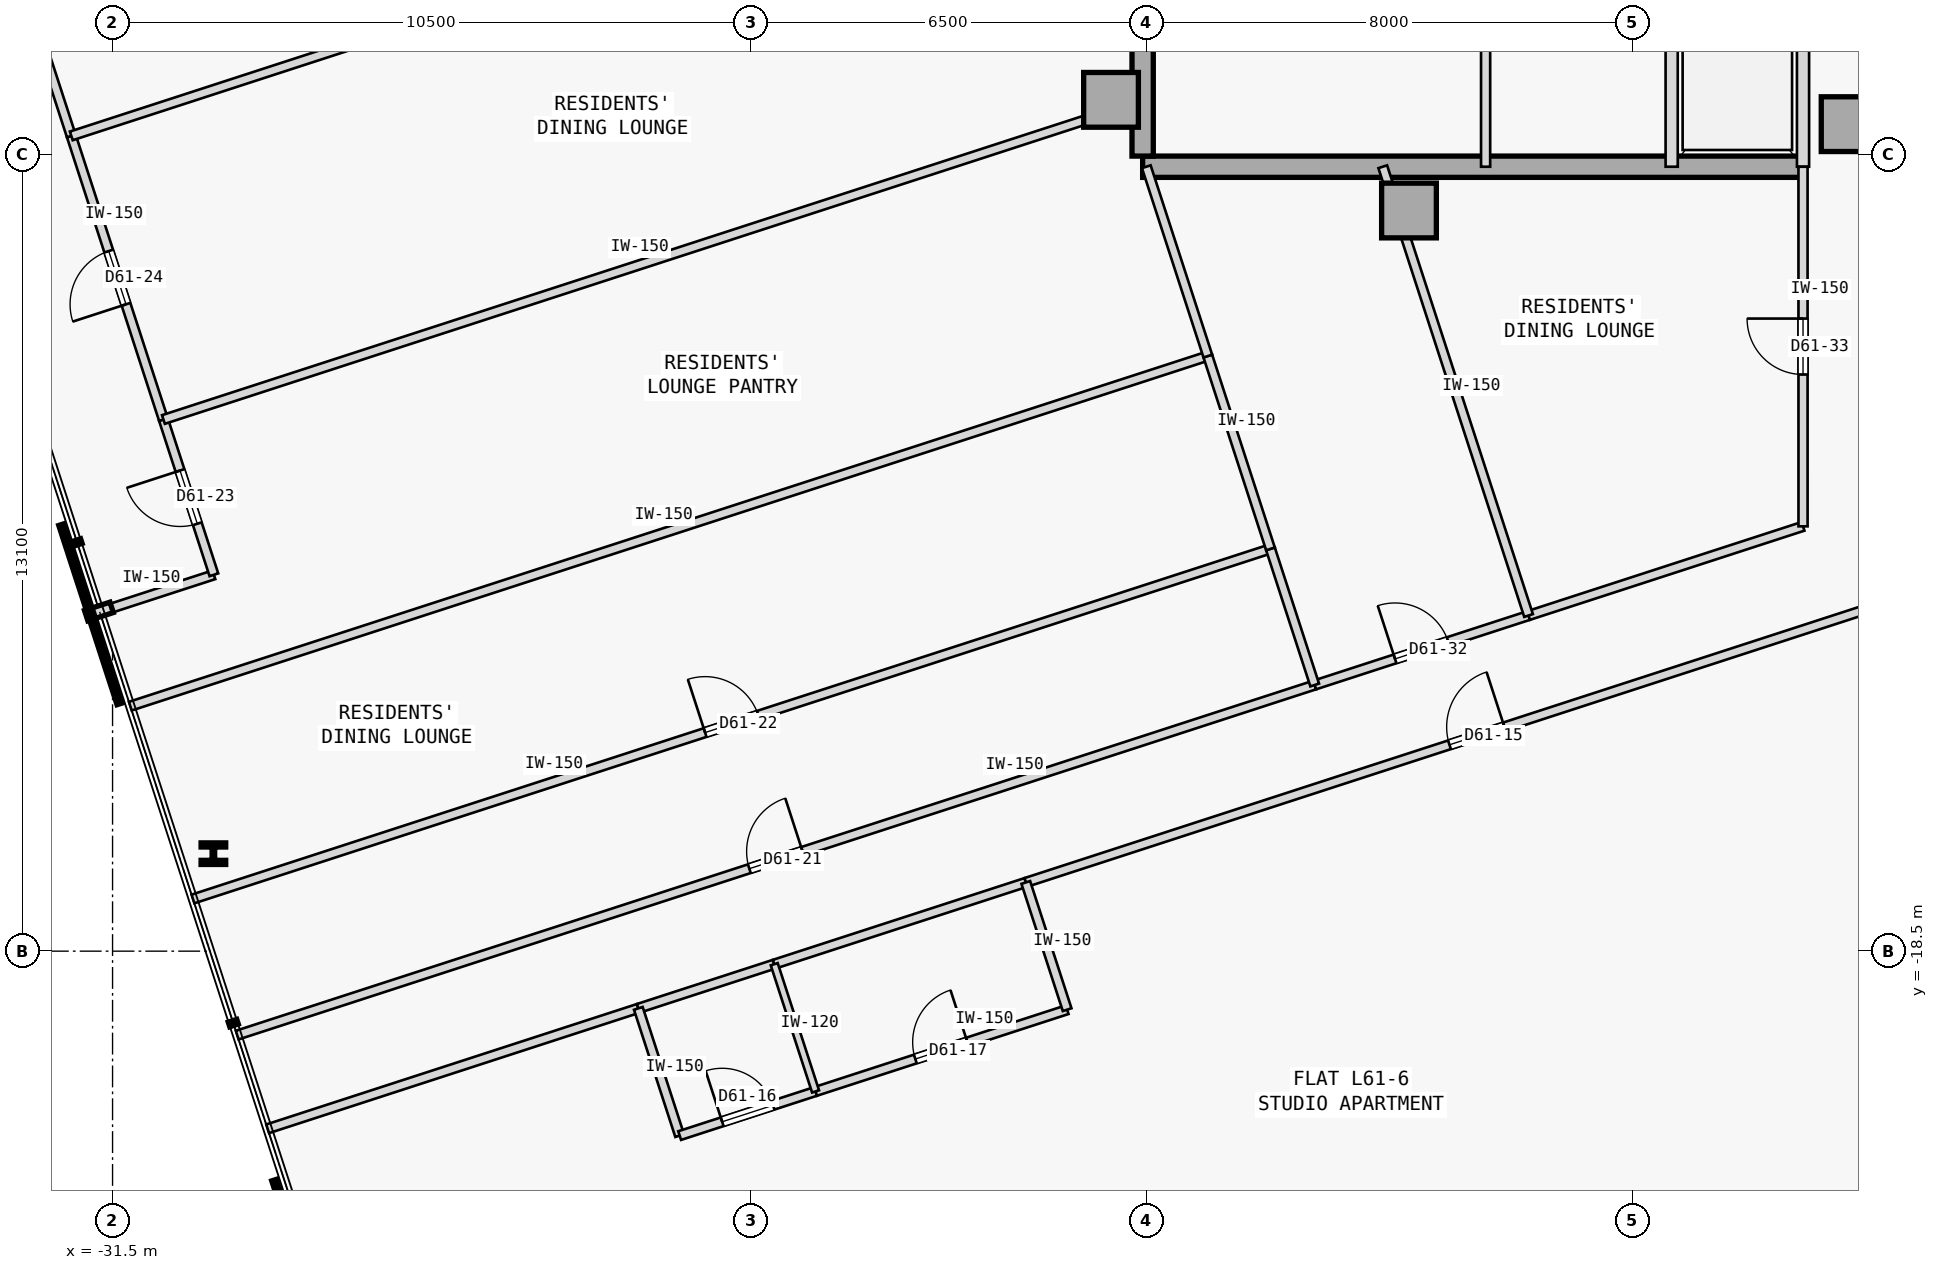
"""IFC4 building model, lengths in metres.
Left out: names, types, materials, properties, quantities, classifications, styles, units other than length and angle.
Written with IfcOpenShell. Run it as: python <this file> out.ifc"""

import sys

from ifc_helpers import new_model, si_unit, direction, frame, frame_2d, origin, origin_2d, place, context, subcontext, project, spatial, rectangle, i_section, extrude, element, fill, save


model = new_model("IFC4")
c1 = context("Model", 3, precision=1e-05, world=origin(), true_north=direction((0.0, 1.0)))
c2 = subcontext(c1, "Body", "Model", "MODEL_VIEW")
j1 = project(units=[si_unit("LENGTHUNIT", "METRE"), si_unit("PLANEANGLEUNIT", "RADIAN")], contexts=[c1])
p1 = place(None, origin())
s1 = spatial("IfcSite", under=j1, at=p1, CompositionType="ELEMENT")
p2 = place(p1, origin())
s2 = spatial("IfcBuilding", under=s1, at=p2, CompositionType="ELEMENT")
p3 = place(p2, frame((0.0, 0.0, 231.0)))
s3 = spatial("IfcBuildingStorey", under=s2, at=p3, CompositionType="ELEMENT", Elevation=231.0)
for number, where, z_axis, x_axis in (
    (1, (-15.08, -4.5, 0.0), (0.0, 0.0, 1.0), (1.0, 0.0, 0.0)),
    (2, (-10.18, -6.32, 0.0), (0.0, 0.0, 1.0), (1.0, 0.0, 0.0)),
    (3, (-2.95, -4.9, 0.0), (0.0, 0.0, 1.0), (1.0, 0.0, 0.0)),
):
    element("IfcColumn", number, at=place(p3, frame(where, z_axis=z_axis, x_axis=x_axis)), inside=s3, PredefinedType="COLUMN", context=c2, shape_type="SweptSolid", body=[
        extrude(rectangle(XDim=0.9, YDim=0.9, at=origin_2d()), origin(), (0.0, 0.0, 1.0), 3.35),
    ])
p4 = place(p3, frame((-14.56, -5.6, 0.0), z_axis=(0.0, 0.0, 1.0), x_axis=(1.0, 0.0, 0.0)))
e4 = element("IfcWall", 4, at=p4, inside=s3, PredefinedType="SHEAR", context=c2, shape_type="SweptSolid", body=[
    extrude(rectangle(XDim=10.86, YDim=0.35, at=frame_2d((5.43, 0.0))), origin(), (0.0, 0.0, 1.0), 3.125),
])
p5 = place(p3, frame((-14.56, -5.425, 0.0), z_axis=(0.0, 0.0, 1.0), x_axis=(0.0, 1.0, 0.0)))
e5 = element("IfcWall", 5, at=p5, inside=s3, PredefinedType="SHEAR", context=c2, shape_type="SweptSolid", body=[
    extrude(rectangle(XDim=10.85, YDim=0.35, at=frame_2d((5.425, 0.0))), origin(), (0.0, 0.0, 1.0), 3.125),
])
p6 = place(p3, frame((-29.842, -16.897, 0.0), z_axis=(0.0, 0.0, 1.0), x_axis=(1.0, 0.0, 0.0)))
e6 = element("IfcColumn", 6, at=p6, inside=s3, PredefinedType="COLUMN", context=c2, shape_type="SweptSolid", body=[
    extrude(i_section(OverallWidth=0.405, OverallDepth=0.355, WebThickness=0.042, FlangeThickness=0.068, FilletRadius=0.015, at=origin_2d()), origin(), (0.0, 0.0, 1.0), 3.35),
])
for number, where, z_axis, x_axis in (
    (7, (-3.7, -5.6, 0.0), (0.0, 0.0, 1.0), (0.0, 1.0, 0.0)),
    (8, (-5.86, -5.6, 0.0), (0.0, 0.0, 1.0), (0.0, 1.0, 0.0)),
):
    element("IfcWall", number, at=place(p3, frame(where, z_axis=z_axis, x_axis=x_axis)), inside=s3, PredefinedType="STANDARD", context=c2, shape_type="SweptSolid", body=[
        extrude(rectangle(XDim=2.65, YDim=0.2, at=frame_2d((1.325, 0.0))), origin(), (0.0, 0.0, 1.0), 3.125),
    ])
p7 = place(p3, frame((-8.92, -5.6, 0.0), z_axis=(0.0, 0.0, 1.0), x_axis=(0.0, 1.0, 0.0)))
e9 = element("IfcWall", 9, at=p7, inside=s3, PredefinedType="PARTITIONING", context=c2, shape_type="SweptSolid", body=[
    extrude(rectangle(XDim=2.65, YDim=0.15, at=frame_2d((1.325, 0.0))), origin(), (0.0, 0.0, 1.0), 3.125),
])
p8 = place(p3, frame((-28.95, -21.421, 0.0), z_axis=(0.0, 0.0, 1.0), x_axis=(0.951048062645, 0.309043010825, 0.0)))
e10 = element("IfcWall", 10, at=p8, inside=s3, PredefinedType="PARTITIONING", context=c2, shape_type="SweptSolid", body=[
    extrude(rectangle(XDim=6.41, YDim=0.15, at=frame_2d((3.205, 0.0))), origin(), (0.0, 0.0, 1.0), 3.125),
])
p9 = place(p3, frame((-16.482, -17.37, 0.0), z_axis=(0.0, 0.0, 1.0), x_axis=(0.9510563751, 0.309017428929, 0.0)))
e11 = element("IfcWall", 11, at=p9, inside=s3, PredefinedType="PARTITIONING", context=c2, shape_type="SweptSolid", body=[
    extrude(rectangle(XDim=15.602, YDim=0.15, at=frame_2d((7.801, 0.0))), origin(), (0.0, 0.0, 1.0), 3.125),
])
p10 = place(p9, frame((7.326, 0.0, 0.0)))
e12 = element("IfcOpeningElement", 12, at=p10, cuts=e11, PredefinedType="OPENING", context=c2, shape_type="SweptSolid", body=[
    extrude(rectangle(XDim=0.95, YDim=2.15, at=frame_2d((0.475, 1.075))), frame((0.0, 0.085, 0.0), z_axis=(0.0, -1.0, 0.0), x_axis=(1.0, 0.0, 0.0)), (0.0, 0.0, 1.0), 0.17),
])
p11 = place(p3, frame((-22.854, -19.44, 0.0), z_axis=(0.0, 0.0, 1.0), x_axis=(0.951076048914, 0.308956872689, 0.0)))
e13 = element("IfcWall", 13, at=p11, inside=s3, PredefinedType="PARTITIONING", context=c2, shape_type="SweptSolid", body=[
    extrude(rectangle(XDim=2.35, YDim=0.15, at=frame_2d((1.175, 0.0))), origin(), (0.0, 0.0, 1.0), 3.125),
])
p12 = place(p3, frame((-20.619, -18.714, 0.0), z_axis=(0.0, 0.0, 1.0), x_axis=(0.951052627573, 0.309028962374, 0.0)))
e14 = element("IfcWall", 14, at=p12, inside=s3, PredefinedType="PARTITIONING", context=c2, shape_type="SweptSolid", body=[
    extrude(rectangle(XDim=4.35, YDim=0.15, at=frame_2d((2.175, 0.0))), origin(), (0.0, 0.0, 1.0), 3.125),
])
p13 = place(p3, frame((-29.45, -19.881, 0.0), z_axis=(0.0, 0.0, 1.0), x_axis=(0.95105650271, 0.309017036186, 0.0)))
e15 = element("IfcWall", 15, at=p13, inside=s3, PredefinedType="PARTITIONING", context=c2, shape_type="SweptSolid", body=[
    extrude(rectangle(XDim=18.632, YDim=0.15, at=frame_2d((9.316, 0.0))), origin(), (0.0, 0.0, 1.0), 3.125),
])
p14 = place(p13, frame((8.856, 0.0, 0.0)))
e16 = element("IfcOpeningElement", 16, at=p14, cuts=e15, PredefinedType="OPENING", context=c2, shape_type="SweptSolid", body=[
    extrude(rectangle(XDim=0.92, YDim=2.15, at=frame_2d((0.46, 1.075))), frame((0.0, 0.085, 0.0), z_axis=(0.0, -1.0, 0.0), x_axis=(1.0, 0.0, 0.0)), (0.0, 0.0, 1.0), 0.17),
])
p15 = place(p3, frame((-31.712, -12.921, 0.0), z_axis=(0.0, 0.0, 1.0), x_axis=(0.951054051148, 0.309024581215, 0.0)))
e17 = element("IfcWall", 17, at=p15, inside=s3, PredefinedType="PARTITIONING", context=c2, shape_type="SweptSolid", body=[
    extrude(rectangle(XDim=1.975, YDim=0.15, at=frame_2d((0.988, 0.0))), origin(), (0.0, 0.0, 1.0), 3.125),
])
p16 = place(p3, frame((-29.833, -12.311, 0.0), z_axis=(0.0, 0.0, 1.0), x_axis=(-0.309044953986, 0.951047431213, 0.0)))
e18 = element("IfcWall", 18, at=p16, inside=s3, PredefinedType="PARTITIONING", context=c2, shape_type="SweptSolid", body=[
    extrude(rectangle(XDim=2.685, YDim=0.15, at=frame_2d((1.343, 0.0))), origin(), (0.0, 0.0, 1.0), 3.125),
])
p17 = place(p16, frame((0.883, 0.0, 0.0)))
e19 = element("IfcOpeningElement", 19, at=p17, cuts=e18, PredefinedType="OPENING", context=c2, shape_type="SweptSolid", body=[
    extrude(rectangle(XDim=0.92, YDim=2.15, at=frame_2d((0.46, 1.075))), frame((0.0, 0.085, 0.0), z_axis=(0.0, -1.0, 0.0), x_axis=(1.0, 0.0, 0.0)), (0.0, 0.0, 1.0), 0.17),
])
p18 = place(p3, frame((-30.663, -9.757, 0.0), z_axis=(0.0, 0.0, 1.0), x_axis=(-0.309019653166, 0.951055652397, 0.0)))
e20 = element("IfcWall", 20, at=p18, inside=s3, PredefinedType="PARTITIONING", context=c2, shape_type="SweptSolid", body=[
    extrude(rectangle(XDim=4.904, YDim=0.15, at=frame_2d((2.452, 0.0))), origin(), (0.0, 0.0, 1.0), 3.125),
])
p19 = place(p18, frame((1.992, 0.0, 0.0)))
e21 = element("IfcOpeningElement", 21, at=p19, cuts=e20, PredefinedType="OPENING", context=c2, shape_type="SweptSolid", body=[
    extrude(rectangle(XDim=0.92, YDim=2.15, at=frame_2d((0.46, 1.075))), frame((0.0, 0.085, 0.0), z_axis=(0.0, -1.0, 0.0), x_axis=(1.0, 0.0, 0.0)), (0.0, 0.0, 1.0), 0.17),
])
p20 = place(p3, frame((-32.179, -5.093, 0.0), z_axis=(0.0, 0.0, 1.0), x_axis=(-0.309014532869, 0.951057316083, 0.0)))
e22 = element("IfcWall", 22, at=p20, inside=s3, PredefinedType="PARTITIONING", context=c2, shape_type="SweptSolid", body=[
    extrude(rectangle(XDim=4.707, YDim=0.15, at=frame_2d((2.354, 0.0))), origin(), (0.0, 0.0, 1.0), 3.125),
])
p21 = place(p3, frame((-11.73, -14.123, 0.0), z_axis=(0.0, 0.0, 1.0), x_axis=(0.951052502763, 0.309029346483, 0.0)))
e23 = element("IfcWall", 23, at=p21, inside=s3, PredefinedType="PARTITIONING", context=c2, shape_type="SweptSolid", body=[
    extrude(rectangle(XDim=3.698, YDim=0.15, at=frame_2d((1.849, 0.0))), origin(), (0.0, 0.0, 1.0), 3.125),
])
p22 = place(p21, frame((1.389, 0.0, 0.0)))
e24 = element("IfcOpeningElement", 24, at=p22, cuts=e23, PredefinedType="OPENING", context=c2, shape_type="SweptSolid", body=[
    extrude(rectangle(XDim=0.92, YDim=2.15, at=frame_2d((0.46, 1.075))), frame((0.0, 0.085, 0.0), z_axis=(0.0, -1.0, 0.0), x_axis=(1.0, 0.0, 0.0)), (0.0, 0.0, 1.0), 0.17),
])
p23 = place(p3, frame((-8.213, -12.98, 0.0), z_axis=(0.0, 0.0, 1.0), x_axis=(0.951058260096, 0.309011627456, 0.0)))
e25 = element("IfcWall", 25, at=p23, inside=s3, PredefinedType="PARTITIONING", context=c2, shape_type="SweptSolid", body=[
    extrude(rectangle(XDim=4.746, YDim=0.15, at=frame_2d((2.373, 0.0))), origin(), (0.0, 0.0, 1.0), 3.125),
])
p24 = place(p3, frame((-3.7, -11.514, 0.0), z_axis=(0.0, 0.0, 1.0), x_axis=(-8.2572974e-05, 0.999999996591, 0.0)))
e26 = element("IfcWall", 26, at=p24, inside=s3, PredefinedType="PARTITIONING", context=c2, shape_type="SweptSolid", body=[
    extrude(rectangle(XDim=5.913, YDim=0.15, at=frame_2d((2.957, 0.0))), origin(), (0.0, 0.0, 1.0), 3.125),
])
p25 = place(p24, frame((2.497, 0.0, 0.0)))
e27 = element("IfcOpeningElement", 27, at=p25, cuts=e26, PredefinedType="OPENING", context=c2, shape_type="SweptSolid", body=[
    extrude(rectangle(XDim=0.92, YDim=2.15, at=frame_2d((0.46, 1.075))), frame((0.0, 0.085, 0.0), z_axis=(0.0, -1.0, 0.0), x_axis=(1.0, 0.0, 0.0)), (0.0, 0.0, 1.0), 0.17),
])
p26 = place(p3, frame((-22.174, -21.533, 0.0), z_axis=(0.0, 0.0, 1.0), x_axis=(-0.309028364152, 0.951052821956, 0.0)))
e28 = element("IfcWall", 28, at=p26, inside=s3, PredefinedType="PARTITIONING", context=c2, shape_type="SweptSolid", body=[
    extrude(rectangle(XDim=2.2, YDim=0.15, at=frame_2d((1.1, 0.0))), origin(), (0.0, 0.0, 1.0), 3.125),
])
p27 = place(p3, frame((-22.174, -21.533, 0.0), z_axis=(0.0, 0.0, 1.0), x_axis=(0.951045519245, 0.309050837767, 0.0)))
e29 = element("IfcWall", 29, at=p27, inside=s3, PredefinedType="PARTITIONING", context=c2, shape_type="SweptSolid", body=[
    extrude(rectangle(XDim=2.35, YDim=0.15, at=frame_2d((1.175, 0.0))), origin(), (0.0, 0.0, 1.0), 3.125),
])
p28 = place(p27, frame((0.735, 0.0, 0.0)))
e30 = element("IfcOpeningElement", 30, at=p28, cuts=e29, PredefinedType="OPENING", context=c2, shape_type="SweptSolid", body=[
    extrude(rectangle(XDim=0.88, YDim=2.15, at=frame_2d((0.44, 1.075))), frame((0.0, 0.085, 0.0), z_axis=(0.0, -1.0, 0.0), x_axis=(1.0, 0.0, 0.0)), (0.0, 0.0, 1.0), 0.17),
])
p29 = place(p3, frame((-19.939, -20.807, 0.0), z_axis=(0.0, 0.0, 1.0), x_axis=(0.951052627573, 0.309028962374, 0.0)))
e31 = element("IfcWall", 31, at=p29, inside=s3, PredefinedType="PARTITIONING", context=c2, shape_type="SweptSolid", body=[
    extrude(rectangle(XDim=4.35, YDim=0.15, at=frame_2d((2.175, 0.0))), origin(), (0.0, 0.0, 1.0), 3.125),
])
p30 = place(p29, frame((1.725, 0.0, 0.0)))
e32 = element("IfcOpeningElement", 32, at=p30, cuts=e31, PredefinedType="OPENING", context=c2, shape_type="SweptSolid", body=[
    extrude(rectangle(XDim=0.9, YDim=2.15, at=frame_2d((0.45, 1.075))), frame((0.0, 0.085, 0.0), z_axis=(0.0, -1.0, 0.0), x_axis=(1.0, 0.0, 0.0)), (0.0, 0.0, 1.0), 0.17),
])
p31 = place(p3, frame((-15.802, -19.462, 0.0), z_axis=(0.0, 0.0, 1.0), x_axis=(-0.309060979314, 0.951042223598, 0.0)))
e33 = element("IfcWall", 33, at=p31, inside=s3, PredefinedType="PARTITIONING", context=c2, shape_type="SweptSolid", body=[
    extrude(rectangle(XDim=2.2, YDim=0.15, at=frame_2d((1.1, 0.0))), origin(), (0.0, 0.0, 1.0), 3.125),
])
p32 = place(p3, frame((-19.939, -20.807, 0.0), z_axis=(0.0, 0.0, 1.0), x_axis=(-0.309060979314, 0.951042223598, 0.0)))
e34 = element("IfcWall", 34, at=p32, inside=s3, PredefinedType="PARTITIONING", context=c2, shape_type="SweptSolid", body=[
    extrude(rectangle(XDim=2.2, YDim=0.12, at=frame_2d((1.1, 0.0))), origin(), (0.0, 0.0, 1.0), 3.125),
])
p33 = place(p3, frame((-30.178, -17.642, 0.0), z_axis=(0.0, 0.0, 1.0), x_axis=(0.95105650271, 0.309017036186, 0.0)))
e35 = element("IfcWall", 35, at=p33, inside=s3, PredefinedType="PARTITIONING", context=c2, shape_type="SweptSolid", body=[
    extrude(rectangle(XDim=18.632, YDim=0.15, at=frame_2d((9.316, 0.0))), origin(), (0.0, 0.0, 1.0), 3.125),
])
p34 = place(p33, frame((8.856, 0.0, 0.0)))
e36 = element("IfcOpeningElement", 36, at=p34, cuts=e35, PredefinedType="OPENING", context=c2, shape_type="SweptSolid", body=[
    extrude(rectangle(XDim=0.92, YDim=2.15, at=frame_2d((0.46, 1.075))), frame((0.0, 0.085, 0.0), z_axis=(0.0, -1.0, 0.0), x_axis=(1.0, 0.0, 0.0)), (0.0, 0.0, 1.0), 0.17),
])
p35 = place(p3, frame((-11.73, -14.123, 0.0), z_axis=(0.0, 0.0, 1.0), x_axis=(-0.309062621189, 0.951041690035, 0.0)))
e37 = element("IfcWall", 37, at=p35, inside=s3, PredefinedType="PARTITIONING", context=c2, shape_type="SweptSolid", body=[
    extrude(rectangle(XDim=2.354, YDim=0.15, at=frame_2d((1.177, 0.0))), origin(), (0.0, 0.0, 1.0), 3.125),
])
p36 = place(p3, frame((-31.208, -14.471, 0.0), z_axis=(0.0, 0.0, 1.0), x_axis=(0.951057753948, 0.309013185244, 0.0)))
e38 = element("IfcWall", 38, at=p36, inside=s3, PredefinedType="PARTITIONING", context=c2, shape_type="SweptSolid", body=[
    extrude(rectangle(XDim=18.632, YDim=0.15, at=frame_2d((9.316, 0.0))), origin(), (0.0, 0.0, 1.0), 3.125),
])
p37 = place(p3, frame((-12.458, -11.884, 0.0), z_axis=(0.0, 0.0, 1.0), x_axis=(-0.308946982245, 0.951079261766, 0.0)))
e39 = element("IfcWall", 39, at=p37, inside=s3, PredefinedType="PARTITIONING", context=c2, shape_type="SweptSolid", body=[
    extrude(rectangle(XDim=3.334, YDim=0.15, at=frame_2d((1.667, 0.0))), origin(), (0.0, 0.0, 1.0), 3.125),
])
p38 = place(p3, frame((-30.663, -9.757, 0.0), z_axis=(0.0, 0.0, 1.0), x_axis=(0.951058192995, 0.309011833974, 0.0)))
e40 = element("IfcWall", 40, at=p38, inside=s3, PredefinedType="PARTITIONING", context=c2, shape_type="SweptSolid", body=[
    extrude(rectangle(XDim=16.657, YDim=0.15, at=frame_2d((8.329, 0.0))), origin(), (0.0, 0.0, 1.0), 3.125),
])
p39 = place(p3, frame((-13.488, -8.713, 0.0), z_axis=(0.0, 0.0, 1.0), x_axis=(-0.309082700143, 0.951035164687, 0.0)))
e41 = element("IfcWall", 41, at=p39, inside=s3, PredefinedType="PARTITIONING", context=c2, shape_type="SweptSolid", body=[
    extrude(rectangle(XDim=3.274, YDim=0.15, at=frame_2d((1.637, 0.0))), origin(), (0.0, 0.0, 1.0), 3.125),
])
p40 = place(p3, frame((-32.179, -5.093, 0.0), z_axis=(0.0, 0.0, 1.0), x_axis=(0.951053885426, 0.309025091239, 0.0)))
e42 = element("IfcWall", 42, at=p40, inside=s3, PredefinedType="PARTITIONING", context=c2, shape_type="SweptSolid", body=[
    extrude(rectangle(XDim=16.657, YDim=0.15, at=frame_2d((8.329, 0.0))), origin(), (0.0, 0.0, 1.0), 3.125),
])
p41 = place(p3, frame((-8.213, -12.98, 0.0), z_axis=(0.0, 0.0, 1.0), x_axis=(-0.309017065592, 0.951056493155, 0.0)))
e43 = element("IfcWall", 43, at=p41, inside=s3, PredefinedType="PARTITIONING", context=c2, shape_type="SweptSolid", body=[
    extrude(rectangle(XDim=7.76, YDim=0.15, at=frame_2d((3.88, 0.0))), origin(), (0.0, 0.0, 1.0), 3.125),
])
p42 = place(p10, origin())
e44 = element("IfcDoor", 44, at=p42, inside=s3, OperationType="SINGLE_SWING_RIGHT", PredefinedType="DOOR", context=c2, shape_type="SweptSolid", body=[
    extrude(rectangle(XDim=0.95, YDim=2.15, at=frame_2d((0.475, 1.075))), frame((0.0, 0.025, 0.0), z_axis=(0.0, -1.0, 0.0), x_axis=(1.0, 0.0, 0.0)), (0.0, 0.0, 1.0), 0.05),
])
fill(e12, e44)
p43 = place(p28, origin())
e45 = element("IfcDoor", 45, at=p43, inside=s3, OperationType="SINGLE_SWING_LEFT", PredefinedType="DOOR", context=c2, shape_type="SweptSolid", body=[
    extrude(rectangle(XDim=0.88, YDim=2.15, at=frame_2d((0.44, 1.075))), frame((0.0, 0.025, 0.0), z_axis=(0.0, -1.0, 0.0), x_axis=(1.0, 0.0, 0.0)), (0.0, 0.0, 1.0), 0.05),
])
fill(e30, e45)
p44 = place(p30, origin())
e46 = element("IfcDoor", 46, at=p44, inside=s3, OperationType="SINGLE_SWING_RIGHT", PredefinedType="DOOR", context=c2, shape_type="SweptSolid", body=[
    extrude(rectangle(XDim=0.9, YDim=2.15, at=frame_2d((0.45, 1.075))), frame((0.0, 0.025, 0.0), z_axis=(0.0, -1.0, 0.0), x_axis=(1.0, 0.0, 0.0)), (0.0, 0.0, 1.0), 0.05),
])
fill(e32, e46)
p45 = place(p14, origin())
e47 = element("IfcDoor", 47, at=p45, inside=s3, OperationType="SINGLE_SWING_RIGHT", PredefinedType="DOOR", context=c2, shape_type="SweptSolid", body=[
    extrude(rectangle(XDim=0.92, YDim=2.15, at=frame_2d((0.46, 1.075))), frame((0.0, 0.025, 0.0), z_axis=(0.0, -1.0, 0.0), x_axis=(1.0, 0.0, 0.0)), (0.0, 0.0, 1.0), 0.05),
])
fill(e16, e47)
p46 = place(p34, origin())
e48 = element("IfcDoor", 48, at=p46, inside=s3, OperationType="SINGLE_SWING_LEFT", PredefinedType="DOOR", context=c2, shape_type="SweptSolid", body=[
    extrude(rectangle(XDim=0.92, YDim=2.15, at=frame_2d((0.46, 1.075))), frame((0.0, 0.025, 0.0), z_axis=(0.0, -1.0, 0.0), x_axis=(1.0, 0.0, 0.0)), (0.0, 0.0, 1.0), 0.05),
])
fill(e36, e48)
p47 = place(p17, origin())
e49 = element("IfcDoor", 49, at=p47, inside=s3, OperationType="SINGLE_SWING_RIGHT", PredefinedType="DOOR", context=c2, shape_type="SweptSolid", body=[
    extrude(rectangle(XDim=0.92, YDim=2.15, at=frame_2d((0.46, 1.075))), frame((0.0, 0.025, 0.0), z_axis=(0.0, -1.0, 0.0), x_axis=(1.0, 0.0, 0.0)), (0.0, 0.0, 1.0), 0.05),
])
fill(e19, e49)
p48 = place(p19, origin())
e50 = element("IfcDoor", 50, at=p48, inside=s3, OperationType="SINGLE_SWING_LEFT", PredefinedType="DOOR", context=c2, shape_type="SweptSolid", body=[
    extrude(rectangle(XDim=0.92, YDim=2.15, at=frame_2d((0.46, 1.075))), frame((0.0, 0.025, 0.0), z_axis=(0.0, -1.0, 0.0), x_axis=(1.0, 0.0, 0.0)), (0.0, 0.0, 1.0), 0.05),
])
fill(e21, e50)
p49 = place(p22, origin())
e51 = element("IfcDoor", 51, at=p49, inside=s3, OperationType="SINGLE_SWING_LEFT", PredefinedType="DOOR", context=c2, shape_type="SweptSolid", body=[
    extrude(rectangle(XDim=0.92, YDim=2.15, at=frame_2d((0.46, 1.075))), frame((0.0, 0.025, 0.0), z_axis=(0.0, -1.0, 0.0), x_axis=(1.0, 0.0, 0.0)), (0.0, 0.0, 1.0), 0.05),
])
fill(e24, e51)
p50 = place(p25, origin())
e52 = element("IfcDoor", 52, at=p50, inside=s3, OperationType="SINGLE_SWING_RIGHT", PredefinedType="DOOR", context=c2, shape_type="SweptSolid", body=[
    extrude(rectangle(XDim=0.92, YDim=2.15, at=frame_2d((0.46, 1.075))), frame((0.0, 0.025, 0.0), z_axis=(0.0, -1.0, 0.0), x_axis=(1.0, 0.0, 0.0)), (0.0, 0.0, 1.0), 0.05),
])
fill(e27, e52)
save(model, sys.argv[1])
